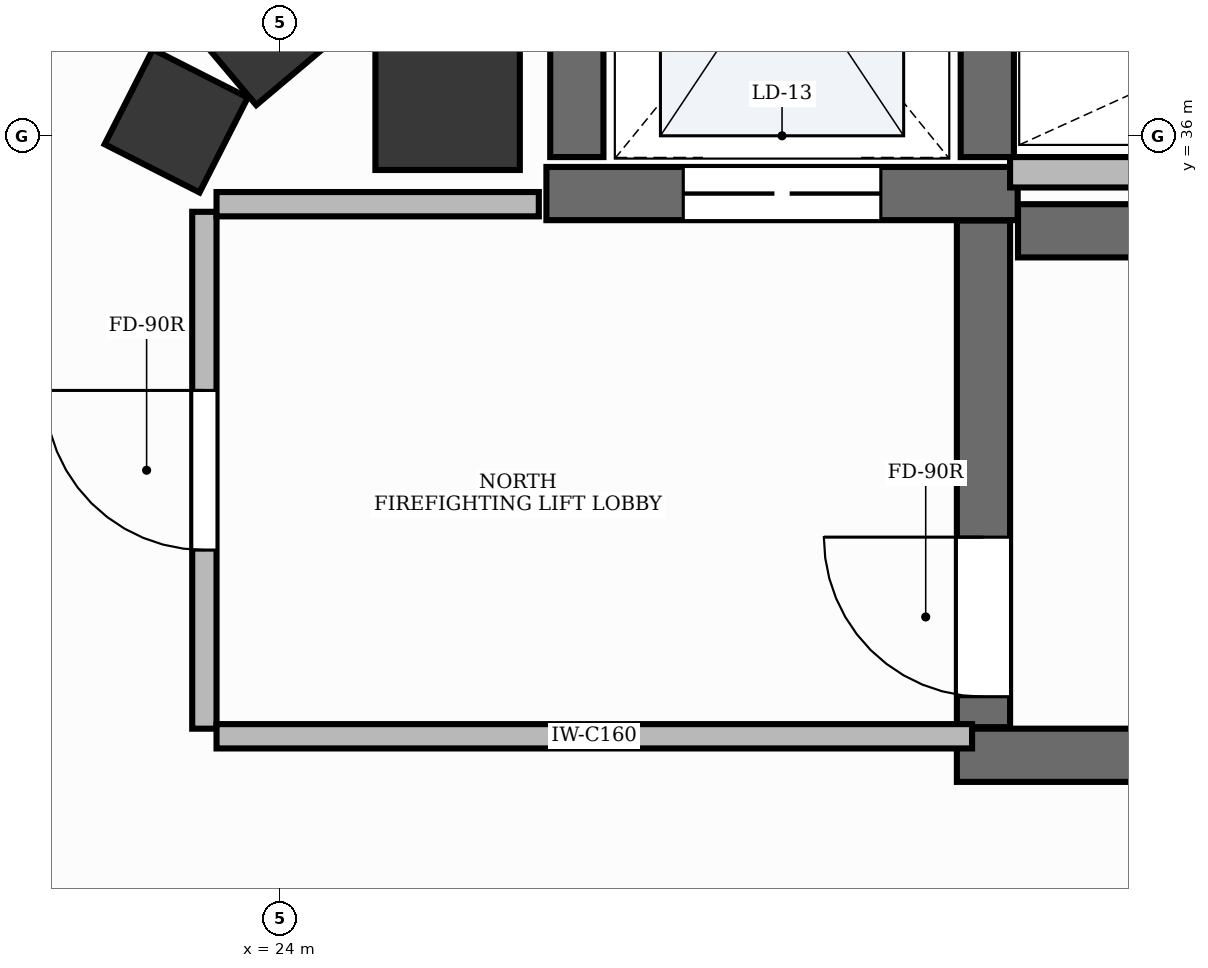
"""IFC4 building model, lengths in metres.
Left out: names, types, materials, properties, quantities, classifications, styles, units other than length and angle.
Written with IfcOpenShell. Run it as: python <this file> out.ifc"""

import sys

from ifc_helpers import new_model, si_unit, direction, frame, frame_2d, origin, origin_2d, place, context, subcontext, project, spatial, rectangle, extrude, element, fill, save


model = new_model("IFC4")
c1 = context("Model", 3, precision=1e-05, world=origin(), true_north=direction((0.0, 1.0)))
c2 = subcontext(c1, "Body", "Model", "MODEL_VIEW")
j1 = project(units=[si_unit("LENGTHUNIT", "METRE"), si_unit("PLANEANGLEUNIT", "RADIAN")], contexts=[c1])
p1 = place(None, origin())
s1 = spatial("IfcSite", under=j1, at=p1, CompositionType="ELEMENT")
p2 = place(p1, origin())
s2 = spatial("IfcBuilding", under=s1, at=p2, CompositionType="ELEMENT")
p3 = place(p2, frame((0.0, 0.0, 335.4)))
s3 = spatial("IfcBuildingStorey", under=s2, at=p3, CompositionType="ELEMENT", Elevation=335.4)
p4 = place(p3, frame((28.852, 35.375, 0.0), z_axis=(0.0, 0.0, 1.0), x_axis=(1.0, 0.0, 0.0)))
e1 = element("IfcWall", 1, at=p4, inside=s3, PredefinedType="SHEAR", context=c2, shape_type="SweptSolid", body=[
    extrude(rectangle(XDim=8.148, YDim=0.35, at=frame_2d((4.074, 0.0))), origin(), (0.0, 0.0, 1.0), 3.88),
])
p5 = place(p3, frame((28.45, 31.925, 0.0), z_axis=(0.0, 0.0, 1.0), x_axis=(1.0, 0.0, 0.0)))
e2 = element("IfcWall", 2, at=p5, inside=s3, PredefinedType="SHEAR", context=c2, shape_type="SweptSolid", body=[
    extrude(rectangle(XDim=8.55, YDim=0.35, at=frame_2d((4.275, 0.0))), origin(), (0.0, 0.0, 1.0), 3.88),
])
p6 = place(p3, frame((28.625, 32.11, 0.0), z_axis=(0.0, 0.0, 1.0), x_axis=(0.0, 1.0, 0.0)))
e3 = element("IfcWall", 3, at=p6, inside=s3, PredefinedType="SHEAR", context=c2, shape_type="SweptSolid", body=[
    extrude(rectangle(XDim=3.333, YDim=0.35, at=frame_2d((1.667, 0.0))), origin(), (0.0, 0.0, 1.0), 3.88),
])
p7 = place(p6, frame((0.2, 0.0, 0.0)))
e4 = element("IfcOpeningElement", 4, at=p7, cuts=e3, PredefinedType="OPENING", context=c2, shape_type="SweptSolid", body=[
    extrude(rectangle(XDim=1.05, YDim=2.15, at=frame_2d((0.525, 1.075))), frame((0.0, 0.19, 0.0), z_axis=(0.0, -1.0, 0.0), x_axis=(1.0, 0.0, 0.0)), (0.0, 0.0, 1.0), 0.38),
])
p8 = place(p3, frame((25.75, 35.62, 0.0), z_axis=(0.0, 0.0, 1.0), x_axis=(1.0, 0.0, 0.0)))
e5 = element("IfcWall", 5, at=p8, inside=s3, PredefinedType="SHEAR", context=c2, shape_type="SweptSolid", body=[
    extrude(rectangle(XDim=3.1, YDim=0.35, at=frame_2d((1.55, 0.0))), origin(), (0.0, 0.0, 1.0), 3.88),
])
p9 = place(p8, frame((0.9, 0.0, 0.0)))
e6 = element("IfcOpeningElement", 6, at=p9, cuts=e5, PredefinedType="OPENING", context=c2, shape_type="SweptSolid", body=[
    extrude(rectangle(XDim=1.3, YDim=2.2, at=frame_2d((0.65, 1.1))), frame((0.0, 0.19, 0.0), z_axis=(0.0, -1.0, 0.0), x_axis=(1.0, 0.0, 0.0)), (0.0, 0.0, 1.0), 0.38),
])
for number, where, z_axis, x_axis in (
    (7, (25.95, 35.86, 0.0), (0.0, 0.0, 1.0), (0.0, 1.0, 0.0)),
    (8, (28.65, 35.86, 0.0), (0.0, 0.0, 1.0), (0.0, 1.0, 0.0)),
):
    element("IfcWall", number, at=place(p3, frame(where, z_axis=z_axis, x_axis=x_axis)), inside=s3, PredefinedType="SHEAR", context=c2, shape_type="SweptSolid", body=[
        extrude(rectangle(XDim=2.7, YDim=0.35, at=frame_2d((1.35, 0.0))), origin(), (0.0, 0.0, 1.0), 3.88),
    ])
p10 = place(p3, frame((25.1, 36.25, -0.0), z_axis=(0.0, 0.0, 1.0), x_axis=(1.0, 0.0, 0.0)))
e9 = element("IfcColumn", 9, at=p10, inside=s3, PredefinedType="PILASTER", context=c2, shape_type="SweptSolid", body=[
    extrude(rectangle(XDim=0.95, YDim=0.95, at=origin_2d()), origin(), (0.0, 0.0, 1.0), 3.881),
])
for number, where, z_axis, x_axis in (
    (10, (23.883, 36.695, -0.0), (0.0, 0.0, 1.0), (0.764, 0.645, 0.0)),
    (11, (23.315, 36.098, -0.0), (0.0, 0.0, 1.0), (0.453, 0.891, 0.0)),
):
    element("IfcColumn", number, at=place(p3, frame(where, z_axis=z_axis, x_axis=x_axis)), inside=s3, PredefinedType="COLUMN", context=c2, shape_type="SweptSolid", body=[
        extrude(rectangle(XDim=0.7, YDim=0.7, at=origin_2d()), origin(), (0.0, 0.0, 1.0), 3.881),
    ])
p11 = place(p3, frame((22.518, 37.482, 0.0), z_axis=(0.0, 0.0, 1.0), x_axis=(-0.642719373216, -0.766101695137, 0.0)))
e12 = element("IfcWall", 12, at=p11, inside=s3, PredefinedType="STANDARD", context=c2, shape_type="SweptSolid", body=[
    extrude(rectangle(XDim=2.072, YDim=0.24, at=frame_2d((1.036, 0.0))), origin(), (0.0, 0.0, 1.0), 3.88),
])
p12 = place(p3, frame((28.8, 35.76, 0.0), z_axis=(0.0, 0.0, 1.0), x_axis=(1.0, 0.0, 0.0)))
e13 = element("IfcWall", 13, at=p12, inside=s3, PredefinedType="PARTITIONING", context=c2, shape_type="SweptSolid", body=[
    extrude(rectangle(XDim=4.57, YDim=0.2, at=frame_2d((2.285, 0.0))), origin(), (0.0, 0.0, 1.0), 2.74),
])
p13 = place(p3, frame((23.5, 32.1, 0.0), z_axis=(0.0, 0.0, 1.0), x_axis=(0.0, 1.0, 0.0)))
e14 = element("IfcWall", 14, at=p13, inside=s3, PredefinedType="PARTITIONING", context=c2, shape_type="SweptSolid", body=[
    extrude(rectangle(XDim=3.4, YDim=0.16, at=frame_2d((1.7, 0.0))), origin(), (0.0, 0.0, 1.0), 2.74),
])
p14 = place(p13, frame((1.175, 0.0, 0.0)))
e15 = element("IfcOpeningElement", 15, at=p14, cuts=e14, PredefinedType="OPENING", context=c2, shape_type="SweptSolid", body=[
    extrude(rectangle(XDim=1.05, YDim=2.15, at=frame_2d((0.525, 1.075))), frame((0.0, 0.095, 0.0), z_axis=(0.0, -1.0, 0.0), x_axis=(1.0, 0.0, 0.0)), (0.0, 0.0, 1.0), 0.19),
])
p15 = place(p3, frame((23.58, 32.05, 0.0), z_axis=(0.0, 0.0, 1.0), x_axis=(1.0, 0.0, 0.0)))
e16 = element("IfcWall", 16, at=p15, inside=s3, PredefinedType="PARTITIONING", context=c2, shape_type="SweptSolid", body=[
    extrude(rectangle(XDim=4.97, YDim=0.16, at=frame_2d((2.485, 0.0))), origin(), (0.0, 0.0, 1.0), 2.74),
])
p16 = place(p3, frame((23.58, 35.55, 0.0), z_axis=(0.0, 0.0, 1.0), x_axis=(1.0, 0.0, 0.0)))
e17 = element("IfcWall", 17, at=p16, inside=s3, PredefinedType="PARTITIONING", context=c2, shape_type="SweptSolid", body=[
    extrude(rectangle(XDim=2.12, YDim=0.16, at=frame_2d((1.06, 0.0))), origin(), (0.0, 0.0, 1.0), 2.74),
])
p17 = place(p7, origin())
e18 = element("IfcDoor", 18, at=p17, inside=s3, OperationType="SINGLE_SWING_RIGHT", PredefinedType="DOOR", context=c2, shape_type="SweptSolid", body=[
    extrude(rectangle(XDim=1.05, YDim=2.15, at=frame_2d((0.525, 1.075))), frame((0.0, 0.025, 0.0), z_axis=(0.0, -1.0, 0.0), x_axis=(1.0, 0.0, 0.0)), (0.0, 0.0, 1.0), 0.05),
])
fill(e4, e18)
p18 = place(p9, origin())
e19 = element("IfcDoor", 19, at=p18, inside=s3, OperationType="DOUBLE_DOOR_SLIDING", PredefinedType="DOOR", context=c2, shape_type="SweptSolid", body=[
    extrude(rectangle(XDim=1.3, YDim=2.2, at=frame_2d((0.65, 1.1))), frame((0.0, 0.025, 0.0), z_axis=(0.0, -1.0, 0.0), x_axis=(1.0, 0.0, 0.0)), (0.0, 0.0, 1.0), 0.05),
])
fill(e6, e19)
p19 = place(p14, origin())
e20 = element("IfcDoor", 20, at=p19, inside=s3, OperationType="SINGLE_SWING_RIGHT", PredefinedType="DOOR", context=c2, shape_type="SweptSolid", body=[
    extrude(rectangle(XDim=1.05, YDim=2.15, at=frame_2d((0.525, 1.075))), frame((0.0, 0.025, 0.0), z_axis=(0.0, -1.0, 0.0), x_axis=(1.0, 0.0, 0.0)), (0.0, 0.0, 1.0), 0.05),
])
fill(e15, e20)
save(model, sys.argv[1])
